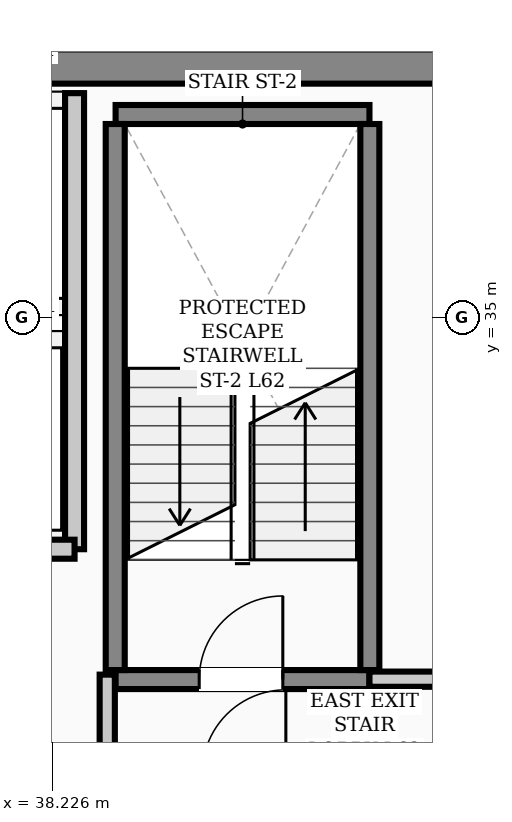
"""IFC4 building model, lengths in metres.
Left out: names, types, materials, properties, quantities, classifications, styles, units other than length and angle.
Written with IfcOpenShell. Run it as: python <this file> out.ifc"""

import sys

from ifc_helpers import new_model, si_unit, direction, frame, frame_2d, origin, place, context, subcontext, project, spatial, rectangle, extrude, element, fill, save


model = new_model("IFC4")
c1 = context("Model", 3, precision=1e-05, world=origin(), true_north=direction((0.0, 1.0)))
c2 = subcontext(c1, "Body", "Model", "MODEL_VIEW")
j1 = project(units=[si_unit("LENGTHUNIT", "METRE"), si_unit("PLANEANGLEUNIT", "RADIAN")], contexts=[c1])
p1 = place(None, origin())
s1 = spatial("IfcSite", under=j1, at=p1, CompositionType="ELEMENT")
p2 = place(p1, origin())
s2 = spatial("IfcBuilding", under=s1, at=p2, CompositionType="ELEMENT")
p3 = place(p2, frame((0.0, 0.0, 250.1)))
s3 = spatial("IfcBuildingStorey", under=s2, at=p3, CompositionType="ELEMENT", Elevation=250.1)
p4 = place(p3, frame((13.5, 38.3, 0.0), z_axis=(0.0, 0.0, 1.0), x_axis=(1.0, 0.0, 0.0)))
e1 = element("IfcWall", 1, at=p4, inside=s3, PredefinedType="SHEAR", context=c2, shape_type="SweptSolid", body=[
    extrude(rectangle(XDim=30.5, YDim=0.45, at=frame_2d((15.25, 0.0))), origin(), (0.0, 0.0, 1.0), 3.72),
])
p5 = place(p3, frame((39.06, 30.235, 0.0), z_axis=(0.0, 0.0, 1.0), x_axis=(1.0, 0.0, 0.0)))
e2 = element("IfcWall", 2, at=p5, inside=s3, PredefinedType="STANDARD", context=c2, shape_type="SweptSolid", body=[
    extrude(rectangle(XDim=3.34, YDim=0.25, at=frame_2d((1.67, 0.0))), origin(), (0.0, 0.0, 1.0), 3.72),
])
p6 = place(p5, frame((1.1, 0.0, 0.0)))
e3 = element("IfcOpeningElement", 3, at=p6, cuts=e2, PredefinedType="OPENING", context=c2, shape_type="SweptSolid", body=[
    extrude(rectangle(XDim=1.1, YDim=2.08, at=frame_2d((0.55, 1.04))), frame((0.0, 0.135, 0.0), z_axis=(0.0, -1.0, 0.0), x_axis=(1.0, 0.0, 0.0)), (0.0, 0.0, 1.0), 0.27),
])
p7 = place(p3, frame((39.06, 37.669, 0.0), z_axis=(0.0, 0.0, 1.0), x_axis=(1.0, 0.0, 0.0)))
e4 = element("IfcWall", 4, at=p7, inside=s3, PredefinedType="STANDARD", context=c2, shape_type="SweptSolid", body=[
    extrude(rectangle(XDim=3.34, YDim=0.25, at=frame_2d((1.67, 0.0))), origin(), (0.0, 0.0, 1.0), 3.72),
])
for number, where, z_axis, x_axis in (
    (5, (39.055, 30.36, 0.0), (0.0, 0.0, 1.0), (0.0, 1.0, 0.0)),
    (6, (42.405, 30.36, 0.0), (0.0, 0.0, 1.0), (0.0, 1.0, 0.0)),
):
    element("IfcWall", number, at=place(p3, frame(where, z_axis=z_axis, x_axis=x_axis)), inside=s3, PredefinedType="STANDARD", context=c2, shape_type="SweptSolid", body=[
        extrude(rectangle(XDim=7.184, YDim=0.25, at=frame_2d((3.592, 0.0))), origin(), (0.0, 0.0, 1.0), 3.72),
    ])
p8 = place(p3, frame((38.52, 31.95, 0.0), z_axis=(0.0, 0.0, 1.0), x_axis=(0.0, 1.0, 0.0)))
e7 = element("IfcWall", 7, at=p8, inside=s3, PredefinedType="STANDARD", context=c2, shape_type="SweptSolid", body=[
    extrude(rectangle(XDim=6.0, YDim=0.25, at=frame_2d((3.0, 0.0))), origin(), (0.0, 0.0, 1.0), 3.48),
])
p9 = place(p3, frame((36.62, 31.95, 0.0), z_axis=(0.0, 0.0, 1.0), x_axis=(1.0, 0.0, 0.0)))
e8 = element("IfcWall", 8, at=p9, inside=s3, PredefinedType="STANDARD", context=c2, shape_type="SweptSolid", body=[
    extrude(rectangle(XDim=1.9, YDim=0.25, at=frame_2d((0.95, 0.0))), origin(), (0.0, 0.0, 1.0), 3.48),
])
p10 = place(p3, frame((42.4, 30.24, 0.0), z_axis=(0.0, 0.0, 1.0), x_axis=(1.0, 0.0, 0.0)))
e9 = element("IfcWall", 9, at=p10, inside=s3, PredefinedType="STANDARD", context=c2, shape_type="SweptSolid", body=[
    extrude(rectangle(XDim=1.365, YDim=0.2, at=frame_2d((0.683, 0.0))), origin(), (0.0, 0.0, 1.0), 3.72),
])
p11 = place(p3, frame((38.95, 29.235, 0.0), z_axis=(0.0, 0.0, 1.0), x_axis=(0.0, 1.0, 0.0)))
e10 = element("IfcWall", 10, at=p11, inside=s3, PredefinedType="STANDARD", context=c2, shape_type="SweptSolid", body=[
    extrude(rectangle(XDim=1.065, YDim=0.2, at=frame_2d((0.532, 0.0))), origin(), (0.0, 0.0, 1.0), 3.72),
])
p12 = place(p6, origin())
e11 = element("IfcDoor", 11, at=p12, inside=s3, OperationType="SINGLE_SWING_RIGHT", PredefinedType="DOOR", context=c2, shape_type="SweptSolid", body=[
    extrude(rectangle(XDim=1.1, YDim=2.08, at=frame_2d((0.55, 1.04))), frame((0.0, 0.025, 0.0), z_axis=(0.0, -1.0, 0.0), x_axis=(1.0, 0.0, 0.0)), (0.0, 0.0, 1.0), 0.05),
])
fill(e3, e11)
save(model, sys.argv[1])
